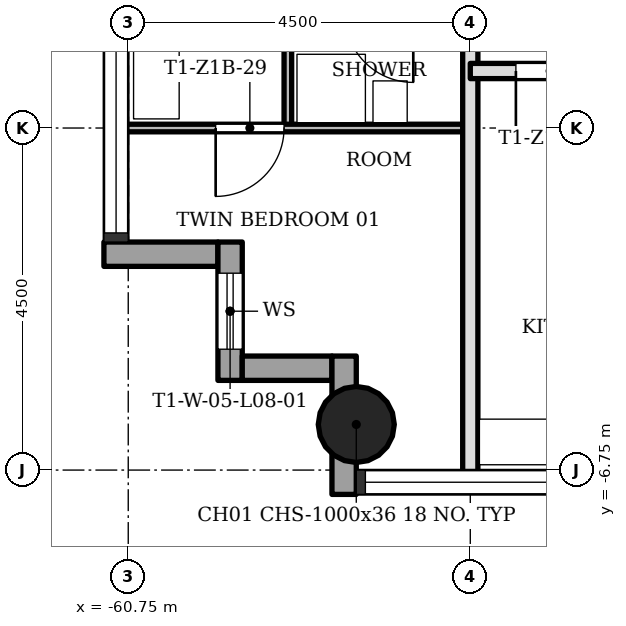
"""IFC4 building model, lengths in metres.
Left out: names, types, materials, properties, quantities, classifications, styles, units other than length and angle.
Written with IfcOpenShell. Run it as: python <this file> out.ifc"""

import sys

from ifc_helpers import new_model, si_unit, direction, frame, frame_2d, origin, origin_2d, place, context, subcontext, project, spatial, rectangle, hollow_circle, extrude, element, fill, save


model = new_model("IFC4")
c1 = context("Model", 3, precision=1e-05, world=origin(), true_north=direction((0.0, 1.0)))
c2 = subcontext(c1, "Body", "Model", "MODEL_VIEW")
j1 = project(units=[si_unit("LENGTHUNIT", "METRE"), si_unit("PLANEANGLEUNIT", "RADIAN")], contexts=[c1])
p1 = place(None, origin())
s1 = spatial("IfcSite", under=j1, at=p1, CompositionType="ELEMENT")
p2 = place(p1, origin())
s2 = spatial("IfcBuilding", under=s1, at=p2, CompositionType="ELEMENT")
p3 = place(p2, frame((0.0, 0.0, 34.7)))
s3 = spatial("IfcBuildingStorey", under=s2, at=p3, CompositionType="ELEMENT", Elevation=34.7)
p4 = place(p3, frame((-57.75, -6.15, 0.0), z_axis=(0.0, 0.0, 1.0), x_axis=(1.0, 0.0, 0.0)))
e1 = element("IfcColumn", 1, at=p4, inside=s3, PredefinedType="COLUMN", context=c2, shape_type="SweptSolid", body=[
    extrude(hollow_circle(Radius=0.5, WallThickness=0.036, at=origin_2d()), origin(), (0.0, 0.0, 1.0), 3.4),
])
p5 = place(p3, frame((-61.07, -3.91, -0.3), z_axis=(0.0, 0.0, 1.0), x_axis=(1.0, 0.0, 0.0)))
e2 = element("IfcWall", 2, at=p5, inside=s3, PredefinedType="STANDARD", context=c2, shape_type="SweptSolid", body=[
    extrude(rectangle(XDim=1.5, YDim=0.32, at=frame_2d((0.75, 0.0))), origin(), (0.0, 0.0, 1.0), 3.4),
])
p6 = place(p3, frame((-59.41, -3.75, -0.3), z_axis=(0.0, 0.0, 1.0), x_axis=(0.0, -1.0, 0.0)))
e3 = element("IfcWall", 3, at=p6, inside=s3, PredefinedType="STANDARD", context=c2, shape_type="SweptSolid", body=[
    extrude(rectangle(XDim=1.82, YDim=0.32, at=frame_2d((0.91, 0.0))), origin(), (0.0, 0.0, 1.0), 3.4),
])
p7 = place(p6, frame((0.41, 0.0, 1.2)))
e4 = element("IfcOpeningElement", 4, at=p7, cuts=e3, PredefinedType="OPENING", context=c2, shape_type="SweptSolid", body=[
    extrude(rectangle(XDim=1.0, YDim=1.5, at=frame_2d((0.5, 0.75))), frame((0.0, 0.17, 0.0), z_axis=(0.0, -1.0, 0.0), x_axis=(1.0, 0.0, 0.0)), (0.0, 0.0, 1.0), 0.34),
])
p8 = place(p3, frame((-59.25, -5.41, -0.3), z_axis=(0.0, 0.0, 1.0), x_axis=(1.0, 0.0, 0.0)))
e5 = element("IfcWall", 5, at=p8, inside=s3, PredefinedType="STANDARD", context=c2, shape_type="SweptSolid", body=[
    extrude(rectangle(XDim=1.18, YDim=0.32, at=frame_2d((0.59, 0.0))), origin(), (0.0, 0.0, 1.0), 3.4),
])
p9 = place(p3, frame((-57.91, -5.25, -0.3), z_axis=(0.0, 0.0, 1.0), x_axis=(0.0, -1.0, 0.0)))
e6 = element("IfcWall", 6, at=p9, inside=s3, PredefinedType="STANDARD", context=c2, shape_type="SweptSolid", body=[
    extrude(rectangle(XDim=1.82, YDim=0.32, at=frame_2d((0.91, 0.0))), origin(), (0.0, 0.0, 1.0), 3.4),
])
p10 = place(p3, frame((-58.65, -2.25, 0.0), z_axis=(0.0, 0.0, 1.0), x_axis=(0.0, 1.0, 0.0)))
e7 = element("IfcWall", 7, at=p10, inside=s3, PredefinedType="PARTITIONING", context=c2, shape_type="SweptSolid", body=[
    extrude(rectangle(XDim=1.5, YDim=0.1, at=frame_2d((0.75, 0.0))), origin(), (0.0, 0.0, 1.0), 3.0),
])
p11 = place(p3, frame((-56.25, -6.85, 0.0), z_axis=(0.0, 0.0, 1.0), x_axis=(0.0, 1.0, 0.0)))
e8 = element("IfcWall", 8, at=p11, inside=s3, PredefinedType="SOLIDWALL", context=c2, shape_type="SweptSolid", body=[
    extrude(rectangle(XDim=13.7, YDim=0.2, at=frame_2d((6.85, 0.0))), origin(), (0.0, 0.0, 1.0), 3.0),
])
p12 = place(p11, frame((6.4, 0.0, 0.0)))
e9 = element("IfcOpeningElement", 9, at=p12, cuts=e8, PredefinedType="OPENING", context=c2, shape_type="SweptSolid", body=[
    extrude(rectangle(XDim=0.9, YDim=2.1, at=frame_2d((0.45, 1.05))), frame((0.0, 0.11, 0.0), z_axis=(0.0, -1.0, 0.0), x_axis=(1.0, 0.0, 0.0)), (0.0, 0.0, 1.0), 0.22),
])
p13 = place(p3, frame((-60.85, -2.25, 0.0), z_axis=(0.0, 0.0, 1.0), x_axis=(1.0, 0.0, 0.0)))
e10 = element("IfcWall", 10, at=p13, inside=s3, PredefinedType="PARTITIONING", context=c2, shape_type="SweptSolid", body=[
    extrude(rectangle(XDim=4.6, YDim=0.1, at=frame_2d((2.3, 0.0))), origin(), (0.0, 0.0, 1.0), 3.0),
])
p14 = place(p13, frame((1.25, 0.0, 0.0)))
e11 = element("IfcOpeningElement", 11, at=p14, cuts=e10, PredefinedType="OPENING", context=c2, shape_type="SweptSolid", body=[
    extrude(rectangle(XDim=0.9, YDim=2.1, at=frame_2d((0.45, 1.05))), frame((0.0, 0.06, 0.0), z_axis=(0.0, -1.0, 0.0), x_axis=(1.0, 0.0, 0.0)), (0.0, 0.0, 1.0), 0.12),
])
p15 = place(p3, frame((-56.25, -1.5, 0.0), z_axis=(0.0, 0.0, 1.0), x_axis=(1.0, 0.0, 0.0)))
e12 = element("IfcWall", 12, at=p15, inside=s3, PredefinedType="SOLIDWALL", context=c2, shape_type="SweptSolid", body=[
    extrude(rectangle(XDim=4.5, YDim=0.2, at=frame_2d((2.25, 0.0))), origin(), (0.0, 0.0, 1.0), 3.0),
])
p16 = place(p15, frame((0.6, 0.0, 0.0)))
e13 = element("IfcOpeningElement", 13, at=p16, cuts=e12, PredefinedType="OPENING", context=c2, shape_type="SweptSolid", body=[
    extrude(rectangle(XDim=0.9, YDim=2.1, at=frame_2d((0.45, 1.05))), frame((0.0, 0.11, 0.0), z_axis=(0.0, -1.0, 0.0), x_axis=(1.0, 0.0, 0.0)), (0.0, 0.0, 1.0), 0.22),
])
p17 = place(p16, origin())
e14 = element("IfcDoor", 14, at=p17, inside=s3, OperationType="SINGLE_SWING_LEFT", PredefinedType="DOOR", context=c2, shape_type="SweptSolid", body=[
    extrude(rectangle(XDim=0.9, YDim=2.1, at=frame_2d((0.45, 1.05))), frame((0.0, 0.025, 0.0), z_axis=(0.0, -1.0, 0.0), x_axis=(1.0, 0.0, 0.0)), (0.0, 0.0, 1.0), 0.05),
])
fill(e13, e14)
p18 = place(p14, origin())
e15 = element("IfcDoor", 15, at=p18, inside=s3, OperationType="SINGLE_SWING_LEFT", PredefinedType="DOOR", context=c2, shape_type="SweptSolid", body=[
    extrude(rectangle(XDim=0.9, YDim=2.1, at=frame_2d((0.45, 1.05))), frame((0.0, 0.025, 0.0), z_axis=(0.0, -1.0, 0.0), x_axis=(1.0, 0.0, 0.0)), (0.0, 0.0, 1.0), 0.05),
])
fill(e11, e15)
p19 = place(p7, origin())
e16 = element("IfcWindow", 16, at=p19, inside=s3, PartitioningType="SINGLE_PANEL", PredefinedType="WINDOW", context=c2, shape_type="SweptSolid", body=[
    extrude(rectangle(XDim=1.0, YDim=1.5, at=frame_2d((0.5, 0.75))), frame((0.0, 0.03, 0.0), z_axis=(0.0, -1.0, 0.0), x_axis=(1.0, 0.0, 0.0)), (0.0, 0.0, 1.0), 0.06),
])
fill(e4, e16)
save(model, sys.argv[1])
